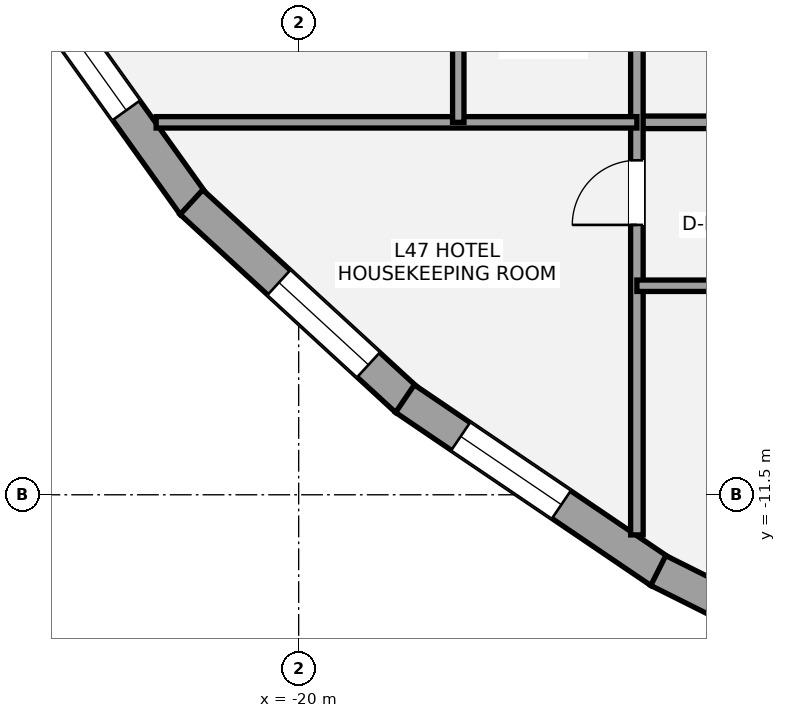
"""IFC4 building model, lengths in metres.
Left out: names, types, materials, properties, quantities, classifications, styles, units other than length and angle.
Written with IfcOpenShell. Run it as: python <this file> out.ifc"""

import sys

from ifc_helpers import new_model, si_unit, direction, frame, frame_2d, origin, place, context, subcontext, project, spatial, rectangle, extrude, element, fill, save


model = new_model("IFC4")
c1 = context("Model", 3, precision=1e-05, world=origin(), true_north=direction((0.0, 1.0)))
c2 = subcontext(c1, "Body", "Model", "MODEL_VIEW")
j1 = project(units=[si_unit("LENGTHUNIT", "METRE"), si_unit("PLANEANGLEUNIT", "RADIAN")], contexts=[c1])
p1 = place(None, origin())
s1 = spatial("IfcSite", under=j1, at=p1, CompositionType="ELEMENT")
p2 = place(p1, origin())
s2 = spatial("IfcBuilding", under=s1, at=p2, CompositionType="ELEMENT")
p3 = place(p2, frame((0.0, 0.0, 172.6)))
s3 = spatial("IfcBuildingStorey", under=s2, at=p3, CompositionType="ELEMENT", Elevation=172.6)
p4 = place(p3, frame((-21.38, -7.684, 0.0), z_axis=(0.0, 0.0, 1.0), x_axis=(-0.581678195571, 0.813419004448, 0.0)))
e1 = element("IfcWall", 1, at=p4, inside=s3, PredefinedType="STANDARD", context=c2, shape_type="SweptSolid", body=[
    extrude(rectangle(XDim=3.621, YDim=0.44, at=frame_2d((1.811, 0.0))), origin(), (0.0, 0.0, 1.0), 2.315),
])
p5 = place(p4, frame((1.526, 0.0, 0.58)))
e2 = element("IfcOpeningElement", 2, at=p5, cuts=e1, PredefinedType="OPENING", context=c2, shape_type="SweptSolid", body=[
    extrude(rectangle(XDim=1.6, YDim=1.55, at=frame_2d((0.8, 0.775))), frame((0.0, 0.23, 0.0), z_axis=(0.0, -1.0, 0.0), x_axis=(1.0, 0.0, 0.0)), (0.0, 0.0, 1.0), 0.46),
])
p6 = place(p3, frame((-18.576, -10.255, 0.0), z_axis=(0.0, 0.0, 1.0), x_axis=(-0.736282263947, 0.676674536093, 0.0)))
e3 = element("IfcWall", 3, at=p6, inside=s3, PredefinedType="STANDARD", context=c2, shape_type="SweptSolid", body=[
    extrude(rectangle(XDim=3.85, YDim=0.44, at=frame_2d((1.925, 0.0))), origin(), (0.0, 0.0, 1.0), 2.315),
])
p7 = place(p6, frame((0.687, 0.0, 0.58)))
e4 = element("IfcOpeningElement", 4, at=p7, cuts=e3, PredefinedType="OPENING", context=c2, shape_type="SweptSolid", body=[
    extrude(rectangle(XDim=1.6, YDim=1.55, at=frame_2d((0.8, 0.775))), frame((0.0, 0.23, 0.0), z_axis=(0.0, -1.0, 0.0), x_axis=(1.0, 0.0, 0.0)), (0.0, 0.0, 1.0), 0.46),
])
p8 = place(p3, frame((-15.243, -12.511, 0.0), z_axis=(0.0, 0.0, 1.0), x_axis=(-0.827757295322, 0.561086321382, 0.0)))
e5 = element("IfcWall", 5, at=p8, inside=s3, PredefinedType="STANDARD", context=c2, shape_type="SweptSolid", body=[
    extrude(rectangle(XDim=4.057, YDim=0.44, at=frame_2d((2.028, 0.0))), origin(), (0.0, 0.0, 1.0), 2.315),
])
p9 = place(p8, frame((1.571, 0.0, 0.58)))
e6 = element("IfcOpeningElement", 6, at=p9, cuts=e5, PredefinedType="OPENING", context=c2, shape_type="SweptSolid", body=[
    extrude(rectangle(XDim=1.6, YDim=1.55, at=frame_2d((0.8, 0.775))), frame((0.0, 0.23, 0.0), z_axis=(0.0, -1.0, 0.0), x_axis=(1.0, 0.0, 0.0)), (0.0, 0.0, 1.0), 0.46),
])
p10 = place(p3, frame((-11.425, -14.418, 0.0), z_axis=(0.0, 0.0, 1.0), x_axis=(-0.894427191, 0.4472135955, 0.0)))
e7 = element("IfcWall", 7, at=p10, inside=s3, PredefinedType="STANDARD", context=c2, shape_type="SweptSolid", body=[
    extrude(rectangle(XDim=4.297, YDim=0.44, at=frame_2d((2.148, 0.0))), origin(), (0.0, 0.0, 1.0), 2.315),
])
p11 = place(p10, frame((0.999, 0.0, 0.58)))
e8 = element("IfcOpeningElement", 8, at=p11, cuts=e7, PredefinedType="OPENING", context=c2, shape_type="SweptSolid", body=[
    extrude(rectangle(XDim=1.6, YDim=1.55, at=frame_2d((0.8, 0.775))), frame((0.0, 0.23, 0.0), z_axis=(0.0, -1.0, 0.0), x_axis=(1.0, 0.0, 0.0)), (0.0, 0.0, 1.0), 0.46),
])
p12 = place(p3, frame((-15.55, -6.6, 0.0), z_axis=(0.0, 0.0, 1.0), x_axis=(1.0, 0.0, 0.0)))
e9 = element("IfcWall", 9, at=p12, inside=s3, PredefinedType="PARTITIONING", context=c2, shape_type="SweptSolid", body=[
    extrude(rectangle(XDim=31.65, YDim=0.165, at=frame_2d((15.825, 0.0))), origin(), (0.0, 0.0, 1.0), 2.398),
])
p13 = place(p12, frame((14.7, 0.0, 0.0)))
e10 = element("IfcOpeningElement", 10, at=p13, cuts=e9, PredefinedType="OPENING", context=c2, shape_type="SweptSolid", body=[
    extrude(rectangle(XDim=0.95, YDim=2.15, at=frame_2d((0.475, 1.075))), frame((0.0, 0.093, 0.0), z_axis=(0.0, -1.0, 0.0), x_axis=(1.0, 0.0, 0.0)), (0.0, 0.0, 1.0), 0.185),
])
p14 = place(p12, frame((30.3, 0.0, 0.0)))
e11 = element("IfcOpeningElement", 11, at=p14, cuts=e9, PredefinedType="OPENING", context=c2, shape_type="SweptSolid", body=[
    extrude(rectangle(XDim=0.95, YDim=2.15, at=frame_2d((0.475, 1.075))), frame((0.0, 0.093, 0.0), z_axis=(0.0, -1.0, 0.0), x_axis=(1.0, 0.0, 0.0)), (0.0, 0.0, 1.0), 0.185),
])
p15 = place(p3, frame((-15.55, -12.028, 0.0), z_axis=(0.0, 0.0, 1.0), x_axis=(0.0, 1.0, 0.0)))
e12 = element("IfcWall", 12, at=p15, inside=s3, PredefinedType="PARTITIONING", context=c2, shape_type="SweptSolid", body=[
    extrude(rectangle(XDim=19.578, YDim=0.165, at=frame_2d((9.789, 0.0))), origin(), (0.0, 0.0, 1.0), 2.473),
])
p16 = place(p15, frame((4.079, 0.0, 0.0)))
e13 = element("IfcOpeningElement", 13, at=p16, cuts=e12, PredefinedType="OPENING", context=c2, shape_type="SweptSolid", body=[
    extrude(rectangle(XDim=0.85, YDim=2.1, at=frame_2d((0.425, 1.05))), frame((0.0, 0.093, 0.0), z_axis=(0.0, -1.0, 0.0), x_axis=(1.0, 0.0, 0.0)), (0.0, 0.0, 1.0), 0.185),
])
p17 = place(p15, frame((8.878, 0.0, 0.0)))
e14 = element("IfcOpeningElement", 14, at=p17, cuts=e12, PredefinedType="OPENING", context=c2, shape_type="SweptSolid", body=[
    extrude(rectangle(XDim=0.95, YDim=2.15, at=frame_2d((0.475, 1.075))), frame((0.0, 0.093, 0.0), z_axis=(0.0, -1.0, 0.0), x_axis=(1.0, 0.0, 0.0)), (0.0, 0.0, 1.0), 0.185),
])
p18 = place(p15, frame((13.478, 0.0, 0.0)))
e15 = element("IfcOpeningElement", 15, at=p18, cuts=e12, PredefinedType="OPENING", context=c2, shape_type="SweptSolid", body=[
    extrude(rectangle(XDim=0.95, YDim=2.15, at=frame_2d((0.475, 1.075))), frame((0.0, 0.093, 0.0), z_axis=(0.0, -1.0, 0.0), x_axis=(1.0, 0.0, 0.0)), (0.0, 0.0, 1.0), 0.185),
])
p19 = place(p15, frame((18.228, 0.0, 0.0)))
e16 = element("IfcOpeningElement", 16, at=p19, cuts=e12, PredefinedType="OPENING", context=c2, shape_type="SweptSolid", body=[
    extrude(rectangle(XDim=0.95, YDim=2.15, at=frame_2d((0.475, 1.075))), frame((0.0, 0.093, 0.0), z_axis=(0.0, -1.0, 0.0), x_axis=(1.0, 0.0, 0.0)), (0.0, 0.0, 1.0), 0.185),
])
p20 = place(p3, frame((-21.875, -6.6, 0.0), z_axis=(0.0, 0.0, 1.0), x_axis=(1.0, 0.0, 0.0)))
e17 = element("IfcWall", 17, at=p20, inside=s3, PredefinedType="PLUMBINGWALL", context=c2, shape_type="SweptSolid", body=[
    extrude(rectangle(XDim=6.325, YDim=0.15, at=frame_2d((3.163, 0.0))), origin(), (0.0, 0.0, 1.0), 2.473),
])
p21 = place(p3, frame((-15.55, -8.75, 0.0), z_axis=(0.0, 0.0, 1.0), x_axis=(1.0, 0.0, 0.0)))
e18 = element("IfcWall", 18, at=p21, inside=s3, PredefinedType="PLUMBINGWALL", context=c2, shape_type="SweptSolid", body=[
    extrude(rectangle(XDim=1.85, YDim=0.15, at=frame_2d((0.925, 0.0))), origin(), (0.0, 0.0, 1.0), 2.473),
])
p22 = place(p3, frame((-17.9, -6.6, 0.0), z_axis=(0.0, 0.0, 1.0), x_axis=(0.0, 1.0, 0.0)))
e19 = element("IfcWall", 19, at=p22, inside=s3, PredefinedType="PLUMBINGWALL", context=c2, shape_type="SweptSolid", body=[
    extrude(rectangle(XDim=2.15, YDim=0.15, at=frame_2d((1.075, 0.0))), origin(), (0.0, 0.0, 1.0), 2.473),
])
p23 = place(p22, frame((1.0, 0.0, 0.0)))
e20 = element("IfcOpeningElement", 20, at=p23, cuts=e19, PredefinedType="OPENING", context=c2, shape_type="SweptSolid", body=[
    extrude(rectangle(XDim=0.8, YDim=2.1, at=frame_2d((0.4, 1.05))), frame((0.0, 0.085, 0.0), z_axis=(0.0, -1.0, 0.0), x_axis=(1.0, 0.0, 0.0)), (0.0, 0.0, 1.0), 0.17),
])
p24 = place(p5, origin())
e21 = element("IfcWindow", 21, at=p24, inside=s3, PartitioningType="SINGLE_PANEL", PredefinedType="WINDOW", context=c2, shape_type="SweptSolid", body=[
    extrude(rectangle(XDim=1.6, YDim=1.55, at=frame_2d((0.8, 0.775))), frame((0.0, -0.01, 0.0), z_axis=(0.0, -1.0, 0.0), x_axis=(1.0, 0.0, 0.0)), (0.0, 0.0, 1.0), 0.06),
])
fill(e2, e21)
p25 = place(p7, origin())
e22 = element("IfcWindow", 22, at=p25, inside=s3, PartitioningType="SINGLE_PANEL", PredefinedType="WINDOW", context=c2, shape_type="SweptSolid", body=[
    extrude(rectangle(XDim=1.6, YDim=1.55, at=frame_2d((0.8, 0.775))), frame((0.0, -0.01, 0.0), z_axis=(0.0, -1.0, 0.0), x_axis=(1.0, 0.0, 0.0)), (0.0, 0.0, 1.0), 0.06),
])
fill(e4, e22)
p26 = place(p9, origin())
e23 = element("IfcWindow", 23, at=p26, inside=s3, PartitioningType="SINGLE_PANEL", PredefinedType="WINDOW", context=c2, shape_type="SweptSolid", body=[
    extrude(rectangle(XDim=1.6, YDim=1.55, at=frame_2d((0.8, 0.775))), frame((0.0, -0.01, 0.0), z_axis=(0.0, -1.0, 0.0), x_axis=(1.0, 0.0, 0.0)), (0.0, 0.0, 1.0), 0.06),
])
fill(e6, e23)
p27 = place(p16, origin())
e24 = element("IfcDoor", 24, at=p27, inside=s3, OperationType="SINGLE_SWING_LEFT", PredefinedType="DOOR", context=c2, shape_type="SweptSolid", body=[
    extrude(rectangle(XDim=0.85, YDim=2.1, at=frame_2d((0.425, 1.05))), frame((0.0, 0.025, 0.0), z_axis=(0.0, -1.0, 0.0), x_axis=(1.0, 0.0, 0.0)), (0.0, 0.0, 1.0), 0.05),
])
fill(e13, e24)
save(model, sys.argv[1])
